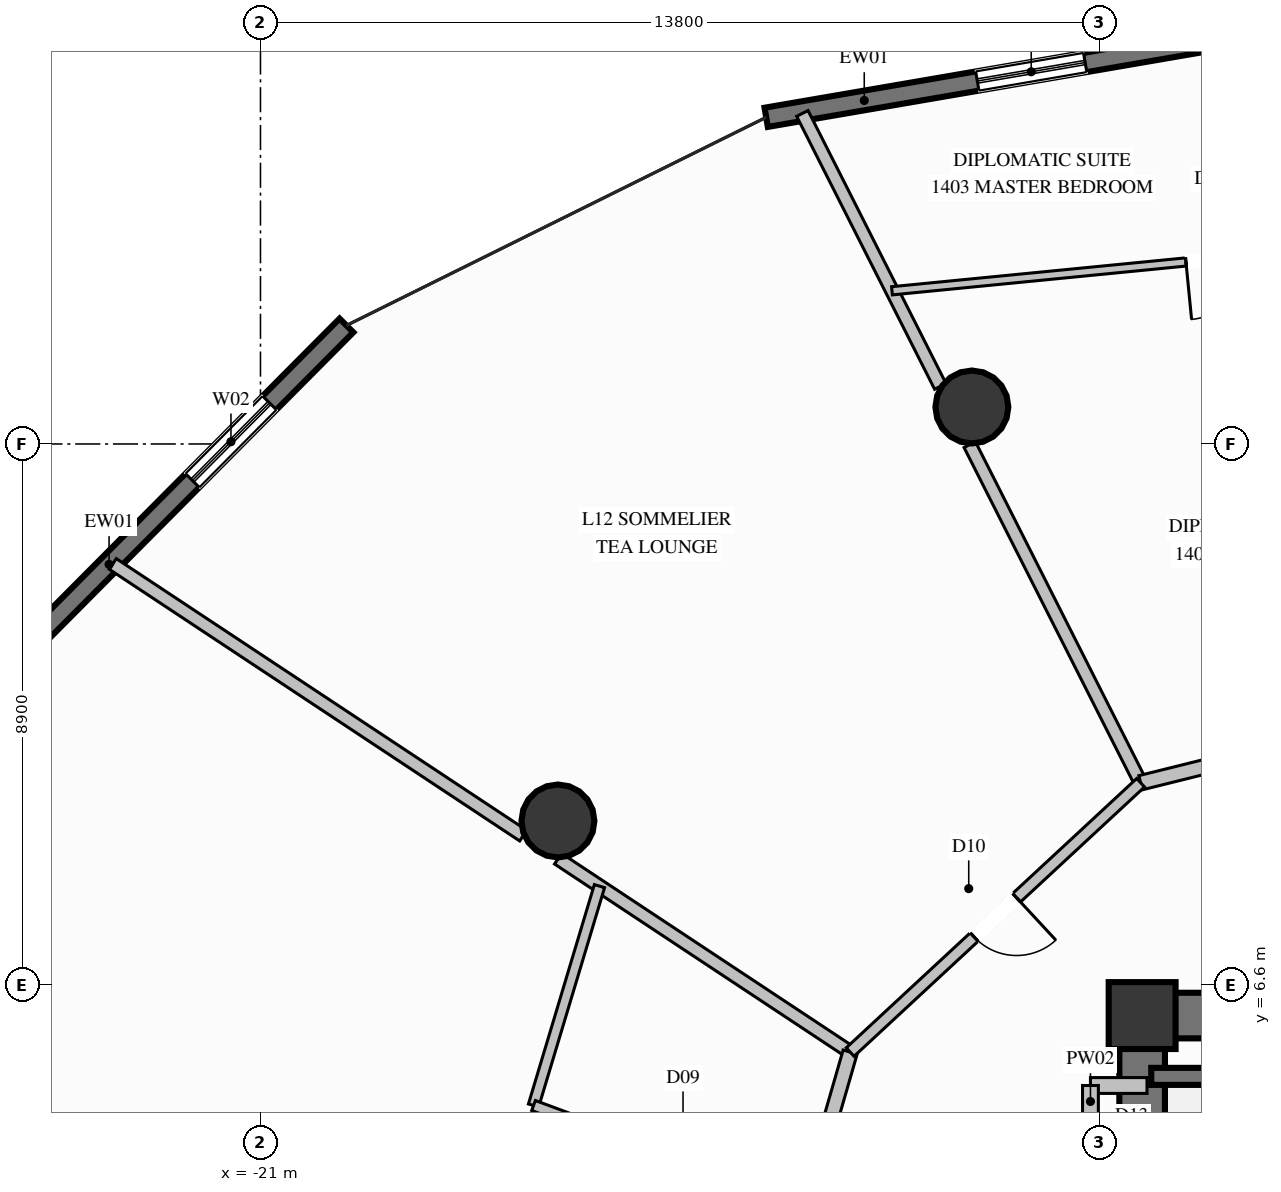
"""IFC4 building model, lengths in metres.
Left out: names, types, materials, properties, quantities, classifications, styles, units other than length and angle.
Written with IfcOpenShell. Run it as: python <this file> out.ifc"""

import sys

from ifc_helpers import new_model, si_unit, direction, frame, frame_2d, origin, origin_2d, place, context, subcontext, project, spatial, rectangle, circle, extrude, element, fill, save


model = new_model("IFC4")
c1 = context("Model", 3, precision=1e-05, world=origin(), true_north=direction((0.0, 1.0)))
c2 = subcontext(c1, "Body", "Model", "MODEL_VIEW")
j1 = project(units=[si_unit("LENGTHUNIT", "METRE"), si_unit("PLANEANGLEUNIT", "RADIAN")], contexts=[c1])
p1 = place(None, origin())
s1 = spatial("IfcSite", under=j1, at=p1, CompositionType="ELEMENT")
p2 = place(p1, origin())
s2 = spatial("IfcBuilding", under=s1, at=p2, CompositionType="ELEMENT")
p3 = place(p2, frame((0.0, 0.0, 53.6)))
s3 = spatial("IfcBuildingStorey", under=s2, at=p3, CompositionType="ELEMENT", Elevation=53.6)
p4 = place(p3, frame((-6.5, 6.1, 0.0), z_axis=(0.0, 0.0, 1.0), x_axis=(1.0, 0.0, 0.0)))
e1 = element("IfcColumn", 1, at=p4, inside=s3, PredefinedType="COLUMN", context=c2, shape_type="SweptSolid", body=[
    extrude(rectangle(XDim=1.1, YDim=1.1, at=origin_2d()), origin(), (0.0, 0.0, 1.0), 3.6),
])
p5 = place(p3, frame((-6.125, 6.1, 0.0), z_axis=(0.0, 0.0, 1.0), x_axis=(1.0, 0.0, 0.0)))
e2 = element("IfcWall", 2, at=p5, inside=s3, PredefinedType="SHEAR", context=c2, shape_type="SweptSolid", body=[
    extrude(rectangle(XDim=2.525, YDim=0.75, at=frame_2d((1.262, 0.0))), origin(), (0.0, 0.0, 1.0), 3.6),
])
p6 = place(p3, frame((-6.5, 2.35, 0.0), z_axis=(0.0, 0.0, 1.0), x_axis=(0.0, 1.0, 0.0)))
e3 = element("IfcWall", 3, at=p6, inside=s3, PredefinedType="SHEAR", context=c2, shape_type="SweptSolid", body=[
    extrude(rectangle(XDim=4.125, YDim=0.75, at=frame_2d((2.062, 0.0))), origin(), (0.0, 0.0, 1.0), 3.6),
])
for number, where, z_axis, x_axis in (
    (4, (-9.3, 16.108, 0.0), (0.0, 0.0, 1.0), (1.0, 0.0, 0.0)),
    (5, (-16.108, 9.3, 0.0), (0.0, 0.0, 1.0), (1.0, 0.0, 0.0)),
):
    element("IfcColumn", number, at=place(p3, frame(where, z_axis=z_axis, x_axis=x_axis)), inside=s3, PredefinedType="COLUMN", context=c2, shape_type="SweptSolid", body=[
        extrude(circle(Radius=0.6, at=origin_2d()), origin(), (0.0, 0.0, 1.0), 3.6),
    ])
p7 = place(p3, frame((-12.683, 20.872, 0.0), z_axis=(0.0, 0.0, 1.0), x_axis=(0.985562327857, 0.16931301754, 0.0)))
e6 = element("IfcWall", 6, at=p7, inside=s3, PredefinedType="SOLIDWALL", context=c2, shape_type="SweptSolid", body=[
    extrude(rectangle(XDim=8.15, YDim=0.32, at=frame_2d((4.075, 0.0))), origin(), (0.0, 0.0, 1.0), 3.34),
])
p8 = place(p7, frame((3.523, 0.0, 0.35)))
e7 = element("IfcOpeningElement", 7, at=p8, cuts=e6, PredefinedType="OPENING", context=c2, shape_type="SweptSolid", body=[
    extrude(rectangle(XDim=1.8, YDim=2.6, at=frame_2d((0.9, 1.3))), frame((0.0, 0.17, 0.0), z_axis=(0.0, -1.0, 0.0), x_axis=(1.0, 0.0, 0.0)), (0.0, 0.0, 1.0), 0.34),
])
p9 = place(p3, frame((-24.684, 12.318, 0.0), z_axis=(0.0, 0.0, 1.0), x_axis=(0.704841676805, 0.709364652798, 0.0)))
e8 = element("IfcWall", 8, at=p9, inside=s3, PredefinedType="SOLIDWALL", context=c2, shape_type="SweptSolid", body=[
    extrude(rectangle(XDim=7.233, YDim=0.32, at=frame_2d((3.617, 0.0))), origin(), (0.0, 0.0, 1.0), 3.34),
])
p10 = place(p9, frame((3.638, 0.0, 0.35)))
e9 = element("IfcOpeningElement", 9, at=p10, cuts=e8, PredefinedType="OPENING", context=c2, shape_type="SweptSolid", body=[
    extrude(rectangle(XDim=1.8, YDim=2.6, at=frame_2d((0.9, 1.3))), frame((0.0, 0.17, 0.0), z_axis=(0.0, -1.0, 0.0), x_axis=(1.0, 0.0, 0.0)), (0.0, 0.0, 1.0), 0.34),
])
p11 = place(p3, frame((-4.15, 5.1, 0.0), z_axis=(0.0, 0.0, 1.0), x_axis=(-1.0, 0.0, 0.0)))
e10 = element("IfcWall", 10, at=p11, inside=s3, PredefinedType="SOLIDWALL", context=c2, shape_type="SweptSolid", body=[
    extrude(rectangle(XDim=2.2, YDim=0.28, at=frame_2d((1.1, 0.0))), origin(), (0.0, 0.0, 1.0), 3.34),
])
p12 = place(p3, frame((-7.35, 4.95, 0.0), z_axis=(0.0, 0.0, 1.0), x_axis=(1.0, 0.0, 0.0)))
e11 = element("IfcWall", 11, at=p12, inside=s3, PredefinedType="PARTITIONING", context=c2, shape_type="SweptSolid", body=[
    extrude(rectangle(XDim=0.93, YDim=0.26, at=frame_2d((0.465, 0.0))), origin(), (0.0, 0.0, 1.0), 3.34),
])
p13 = place(p3, frame((-7.35, 2.55, 0.0), z_axis=(0.0, 0.0, 1.0), x_axis=(0.0, 1.0, 0.0)))
e12 = element("IfcWall", 12, at=p13, inside=s3, PredefinedType="PARTITIONING", context=c2, shape_type="SweptSolid", body=[
    extrude(rectangle(XDim=2.4, YDim=0.26, at=frame_2d((1.2, 0.0))), origin(), (0.0, 0.0, 1.0), 2.425),
])
p14 = place(p13, frame((0.775, 0.0, 0.0)))
e13 = element("IfcOpeningElement", 13, at=p14, cuts=e12, PredefinedType="OPENING", context=c2, shape_type="SweptSolid", body=[
    extrude(rectangle(XDim=0.85, YDim=2.05, at=frame_2d((0.425, 1.025))), frame((0.0, 0.14, 0.0), z_axis=(0.0, -1.0, 0.0), x_axis=(1.0, 0.0, 0.0)), (0.0, 0.0, 1.0), 0.28),
])
p15 = place(p3, frame((-6.525, 9.929, 0.0), z_axis=(0.0, 0.0, 1.0), x_axis=(-0.451065638839, 0.89249077836, 0.0)))
e14 = element("IfcWall", 14, at=p15, inside=s3, PredefinedType="PARTITIONING", context=c2, shape_type="SweptSolid", body=[
    extrude(rectangle(XDim=6.23, YDim=0.21, at=frame_2d((3.115, 0.0))), origin(), (0.0, 0.0, 1.0), 2.709),
])
p16 = place(p3, frame((-9.819, 16.447, 0.0), z_axis=(0.0, 0.0, 1.0), x_axis=(-0.451073129045, 0.892486992764, 0.0)))
e15 = element("IfcWall", 15, at=p16, inside=s3, PredefinedType="PARTITIONING", context=c2, shape_type="SweptSolid", body=[
    extrude(rectangle(XDim=5.03, YDim=0.21, at=frame_2d((2.515, 0.0))), origin(), (0.0, 0.0, 1.0), 3.34),
])
p17 = place(p3, frame((-11.302, 5.5, 0.0), z_axis=(0.0, 0.0, 1.0), x_axis=(-0.833864799367, 0.551968745833, 0.0)))
e16 = element("IfcWall", 16, at=p17, inside=s3, PredefinedType="PARTITIONING", context=c2, shape_type="SweptSolid", body=[
    extrude(rectangle(XDim=5.761, YDim=0.21, at=frame_2d((2.88, 0.0))), origin(), (0.0, 0.0, 1.0), 2.709),
])
p18 = place(p3, frame((-16.679, 9.059, 0.0), z_axis=(0.0, 0.0, 1.0), x_axis=(-0.833869330646, 0.551961900324, 0.0)))
e17 = element("IfcWall", 17, at=p18, inside=s3, PredefinedType="PARTITIONING", context=c2, shape_type="SweptSolid", body=[
    extrude(rectangle(XDim=8.095, YDim=0.21, at=frame_2d((4.047, 0.0))), origin(), (0.0, 0.0, 1.0), 3.34),
])
p19 = place(p3, frame((-11.302, 5.5, 0.0), z_axis=(0.0, 0.0, 1.0), x_axis=(-0.277475281216, -0.960732776746, 0.0)))
e18 = element("IfcWall", 18, at=p19, inside=s3, PredefinedType="PARTITIONING", context=c2, shape_type="SweptSolid", body=[
    extrude(rectangle(XDim=2.645, YDim=0.24, at=frame_2d((1.322, 0.0))), origin(), (0.0, 0.0, 1.0), 3.34),
])
p20 = place(p3, frame((-15.425, 8.229, 0.0), z_axis=(0.0, 0.0, 1.0), x_axis=(-0.287740266974, -0.957708483184, 0.0)))
e19 = element("IfcWall", 19, at=p20, inside=s3, PredefinedType="PLUMBINGWALL", context=c2, shape_type="SweptSolid", body=[
    extrude(rectangle(XDim=3.767, YDim=0.175, at=frame_2d((1.884, 0.0))), origin(), (0.0, 0.0, 1.0), 3.34),
])
p21 = place(p3, frame((-12.036, 2.959, 0.0), z_axis=(0.0, 0.0, 1.0), x_axis=(-0.937380415371, 0.348307273652, 0.0)))
e20 = element("IfcWall", 20, at=p21, inside=s3, PredefinedType="PLUMBINGWALL", context=c2, shape_type="SweptSolid", body=[
    extrude(rectangle(XDim=4.772, YDim=0.175, at=frame_2d((2.386, 0.0))), origin(), (0.0, 0.0, 1.0), 3.34),
])
p22 = place(p21, frame((1.936, 0.0, 0.0)))
e21 = element("IfcOpeningElement", 21, at=p22, cuts=e20, PredefinedType="OPENING", context=c2, shape_type="SweptSolid", body=[
    extrude(rectangle(XDim=0.9, YDim=2.1, at=frame_2d((0.45, 1.05))), frame((0.0, 0.098, 0.0), z_axis=(0.0, -1.0, 0.0), x_axis=(1.0, 0.0, 0.0)), (0.0, 0.0, 1.0), 0.195),
])
p23 = place(p3, frame((0.0, 11.55, 0.0), z_axis=(0.0, 0.0, 1.0), x_axis=(-0.970496047219, -0.241117030365, 0.0)))
e22 = element("IfcWall", 22, at=p23, inside=s3, PredefinedType="PARTITIONING", context=c2, shape_type="SweptSolid", body=[
    extrude(rectangle(XDim=6.723, YDim=0.24, at=frame_2d((3.362, 0.0))), origin(), (0.0, 0.0, 1.0), 3.34),
])
p24 = place(p3, frame((0.0, 19.06, 0.0), z_axis=(0.0, 0.0, 1.0), x_axis=(-0.995224645092, -0.097610992218, 0.0)))
e23 = element("IfcWall", 23, at=p24, inside=s3, PredefinedType="PARTITIONING", context=c2, shape_type="SweptSolid", body=[
    extrude(rectangle(XDim=10.665, YDim=0.135, at=frame_2d((5.333, 0.0))), origin(), (0.0, 0.0, 1.0), 2.792),
])
p25 = place(p24, frame((4.857, 0.0, 0.0)))
e24 = element("IfcOpeningElement", 24, at=p25, cuts=e23, PredefinedType="OPENING", context=c2, shape_type="SweptSolid", body=[
    extrude(rectangle(XDim=0.95, YDim=2.1, at=frame_2d((0.475, 1.05))), frame((0.0, 0.078, 0.0), z_axis=(0.0, -1.0, 0.0), x_axis=(1.0, 0.0, 0.0)), (0.0, 0.0, 1.0), 0.155),
])
p26 = place(p3, frame((-6.525, 9.929, 0.0), z_axis=(0.0, 0.0, 1.0), x_axis=(-0.733323191675, -0.679880207501, 0.0)))
e25 = element("IfcWall", 25, at=p26, inside=s3, PredefinedType="PARTITIONING", context=c2, shape_type="SweptSolid", body=[
    extrude(rectangle(XDim=6.514, YDim=0.19, at=frame_2d((3.257, 0.0))), origin(), (0.0, 0.0, 1.0), 3.34),
])
p27 = place(p26, frame((2.782, 0.0, 0.0)))
e26 = element("IfcOpeningElement", 26, at=p27, cuts=e25, PredefinedType="OPENING", context=c2, shape_type="SweptSolid", body=[
    extrude(rectangle(XDim=0.95, YDim=2.1, at=frame_2d((0.475, 1.05))), frame((0.0, 0.105, 0.0), z_axis=(0.0, -1.0, 0.0), x_axis=(1.0, 0.0, 0.0)), (0.0, 0.0, 1.0), 0.21),
])
p28 = place(p8, origin())
e27 = element("IfcWindow", 27, at=p28, inside=s3, PartitioningType="SINGLE_PANEL", PredefinedType="WINDOW", context=c2, shape_type="SweptSolid", body=[
    extrude(rectangle(XDim=1.8, YDim=2.6, at=frame_2d((0.9, 1.3))), frame((0.0, 0.03, 0.0), z_axis=(0.0, -1.0, 0.0), x_axis=(1.0, 0.0, 0.0)), (0.0, 0.0, 1.0), 0.06),
])
fill(e7, e27)
p29 = place(p10, origin())
e28 = element("IfcWindow", 28, at=p29, inside=s3, PartitioningType="SINGLE_PANEL", PredefinedType="WINDOW", context=c2, shape_type="SweptSolid", body=[
    extrude(rectangle(XDim=1.8, YDim=2.6, at=frame_2d((0.9, 1.3))), frame((0.0, 0.03, 0.0), z_axis=(0.0, -1.0, 0.0), x_axis=(1.0, 0.0, 0.0)), (0.0, 0.0, 1.0), 0.06),
])
fill(e9, e28)
p30 = place(p25, origin())
e29 = element("IfcDoor", 29, at=p30, inside=s3, OperationType="SINGLE_SWING_RIGHT", PredefinedType="DOOR", context=c2, shape_type="SweptSolid", body=[
    extrude(rectangle(XDim=0.95, YDim=2.1, at=frame_2d((0.475, 1.05))), frame((0.0, 0.025, 0.0), z_axis=(0.0, -1.0, 0.0), x_axis=(1.0, 0.0, 0.0)), (0.0, 0.0, 1.0), 0.05),
])
fill(e24, e29)
p31 = place(p27, origin())
e30 = element("IfcDoor", 30, at=p31, inside=s3, OperationType="SINGLE_SWING_LEFT", PredefinedType="DOOR", context=c2, shape_type="SweptSolid", body=[
    extrude(rectangle(XDim=0.95, YDim=2.1, at=frame_2d((0.475, 1.05))), frame((0.0, 0.025, 0.0), z_axis=(0.0, -1.0, 0.0), x_axis=(1.0, 0.0, 0.0)), (0.0, 0.0, 1.0), 0.05),
])
fill(e26, e30)
save(model, sys.argv[1])
